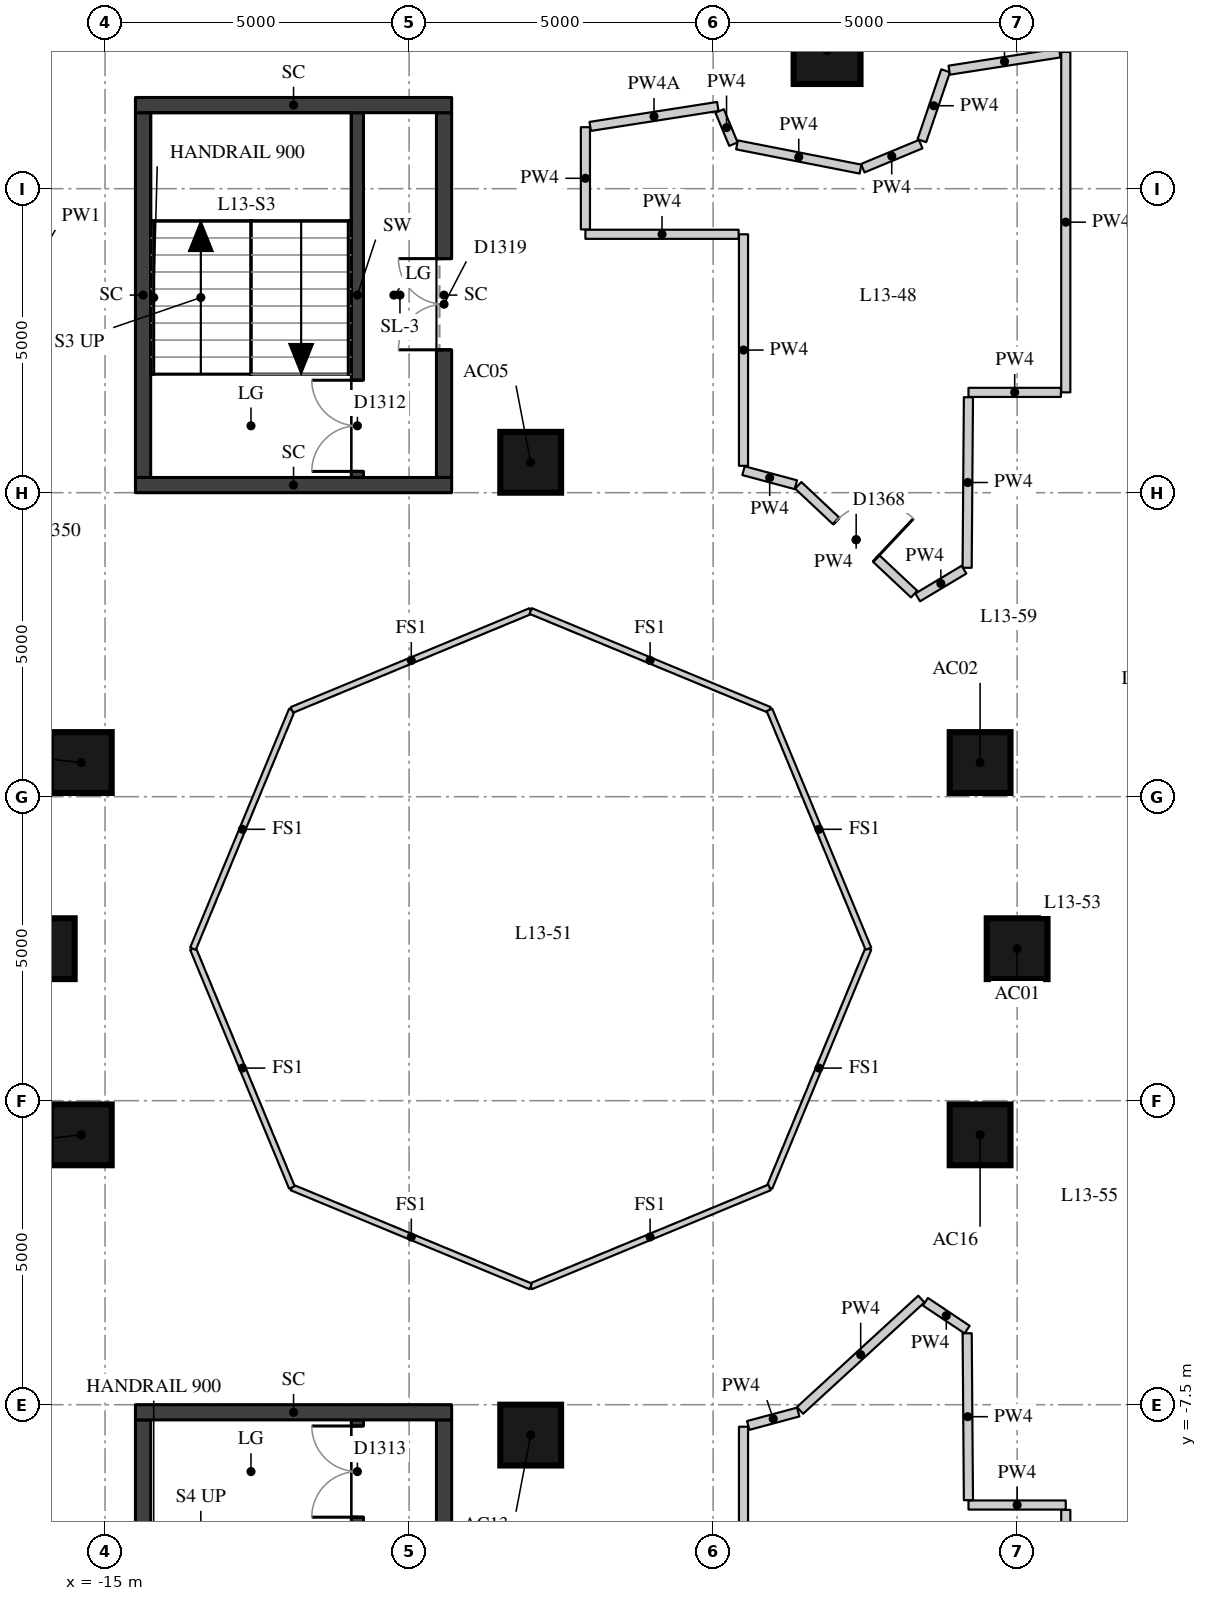
"""IFC4 building model, lengths in metres.
Left out: names, types, materials, properties, quantities, classifications, styles, units other than length and angle.
Written with IfcOpenShell. Run it as: python <this file> out.ifc"""

import sys

from ifc_helpers import new_model, si_unit, direction, frame, frame_2d, origin, origin_2d, place, context, subcontext, project, spatial, rectangle, extrude, element, fill, save


model = new_model("IFC4")
c1 = context("Model", 3, precision=1e-05, world=origin(), true_north=direction((0.0, 1.0)))
c2 = subcontext(c1, "Body", "Model", "MODEL_VIEW")
j1 = project(units=[si_unit("LENGTHUNIT", "METRE"), si_unit("PLANEANGLEUNIT", "RADIAN")], contexts=[c1])
p1 = place(None, origin())
s1 = spatial("IfcSite", under=j1, at=p1, CompositionType="ELEMENT")
p2 = place(p1, origin())
s2 = spatial("IfcBuilding", under=s1, at=p2, CompositionType="ELEMENT")
p3 = place(p2, frame((0.0, 0.0, 51.4)))
s3 = spatial("IfcBuildingStorey", under=s2, at=p3, CompositionType="ELEMENT", Elevation=51.4)
for number, where, z_axis, x_axis in (
    (1, (0.0, 0.0, 0.0), (0.0, 0.0, 1.0), (1.0, 0.0, 0.0)),
    (2, (-0.609, 3.062, 0.0), (0.0, 0.0, 1.0), (1.0, 0.0, 0.0)),
    (3, (-8.0, 8.0, 0.0), (0.0, 0.0, 1.0), (1.0, 0.0, 0.0)),
    (4, (-15.391, 3.062, 0.0), (0.0, 0.0, 1.0), (1.0, 0.0, 0.0)),
    (5, (-16.0, 0.0, 0.0), (0.0, 0.0, 1.0), (1.0, 0.0, 0.0)),
    (6, (-15.391, -3.062, 0.0), (0.0, 0.0, 1.0), (1.0, 0.0, 0.0)),
    (7, (-8.0, -8.0, 0.0), (0.0, 0.0, 1.0), (1.0, 0.0, 0.0)),
    (8, (-0.609, -3.062, 0.0), (0.0, 0.0, 1.0), (1.0, 0.0, 0.0)),
):
    element("IfcColumn", number, at=place(p3, frame(where, z_axis=z_axis, x_axis=x_axis)), inside=s3, PredefinedType="COLUMN", context=c2, shape_type="SweptSolid", body=[
        extrude(rectangle(XDim=1.0, YDim=1.0, at=origin_2d()), origin(), (0.0, 0.0, 1.0), 3.3),
    ])
p4 = place(p3, frame((-3.126, 14.772, 0.0), z_axis=(0.0, 0.0, 1.0), x_axis=(1.0, 0.0, 0.0)))
e9 = element("IfcColumn", 9, at=p4, inside=s3, PredefinedType="COLUMN", context=c2, shape_type="SweptSolid", body=[
    extrude(rectangle(XDim=1.1, YDim=1.1, at=origin_2d()), origin(), (0.0, 0.0, 1.0), 3.3),
])
p5 = place(p3, frame((-10.85, 7.75, 0.0), z_axis=(0.0, 0.0, 1.0), x_axis=(0.0, 1.0, 0.0)))
e10 = element("IfcWall", 10, at=p5, inside=s3, PredefinedType="SHEAR", context=c2, shape_type="SweptSolid", body=[
    extrude(rectangle(XDim=6.0, YDim=0.2, at=frame_2d((3.0, 0.0))), origin(), (0.0, 0.0, 1.0), 3.02),
])
p6 = place(p5, frame((0.1, 0.0, 0.0)))
e11 = element("IfcOpeningElement", 11, at=p6, cuts=e10, PredefinedType="OPENING", context=c2, shape_type="SweptSolid", body=[
    extrude(rectangle(XDim=1.5, YDim=2.1, at=frame_2d((0.75, 1.05))), frame((0.0, 0.11, 0.0), z_axis=(0.0, -1.0, 0.0), x_axis=(1.0, 0.0, 0.0)), (0.0, 0.0, 1.0), 0.22),
])
p7 = place(p3, frame((-10.85, -13.75, 0.0), z_axis=(0.0, 0.0, 1.0), x_axis=(0.0, 1.0, 0.0)))
e12 = element("IfcWall", 12, at=p7, inside=s3, PredefinedType="SHEAR", context=c2, shape_type="SweptSolid", body=[
    extrude(rectangle(XDim=6.0, YDim=0.2, at=frame_2d((3.0, 0.0))), origin(), (0.0, 0.0, 1.0), 3.02),
])
p8 = place(p7, frame((4.4, 0.0, 0.0)))
e13 = element("IfcOpeningElement", 13, at=p8, cuts=e12, PredefinedType="OPENING", context=c2, shape_type="SweptSolid", body=[
    extrude(rectangle(XDim=1.5, YDim=2.1, at=frame_2d((0.75, 1.05))), frame((0.0, 0.11, 0.0), z_axis=(0.0, -1.0, 0.0), x_axis=(1.0, 0.0, 0.0)), (0.0, 0.0, 1.0), 0.22),
])
p9 = place(p3, frame((-14.375, 7.75, -0.28), z_axis=(0.0, 0.0, 1.0), x_axis=(0.0, 1.0, 0.0)))
e14 = element("IfcWall", 14, at=p9, inside=s3, PredefinedType="SHEAR", context=c2, shape_type="SweptSolid", body=[
    extrude(rectangle(XDim=6.0, YDim=0.25, at=frame_2d((3.0, 0.0))), origin(), (0.0, 0.0, 1.0), 3.3),
])
p10 = place(p3, frame((-9.425, 7.75, -0.28), z_axis=(0.0, 0.0, 1.0), x_axis=(0.0, 1.0, 0.0)))
e15 = element("IfcWall", 15, at=p10, inside=s3, PredefinedType="SHEAR", context=c2, shape_type="SweptSolid", body=[
    extrude(rectangle(XDim=6.0, YDim=0.25, at=frame_2d((3.0, 0.0))), origin(), (0.0, 0.0, 1.0), 3.3),
])
p11 = place(p10, frame((2.1, 0.0, 0.28)))
e16 = element("IfcOpeningElement", 16, at=p11, cuts=e15, PredefinedType="OPENING", context=c2, shape_type="SweptSolid", body=[
    extrude(rectangle(XDim=1.5, YDim=2.1, at=frame_2d((0.75, 1.05))), frame((0.0, 0.135, 0.0), z_axis=(0.0, -1.0, 0.0), x_axis=(1.0, 0.0, 0.0)), (0.0, 0.0, 1.0), 0.27),
])
for number, where, z_axis, x_axis in (
    (17, (-14.5, 13.875, -0.28), (0.0, 0.0, 1.0), (1.0, 0.0, 0.0)),
    (18, (-14.5, 7.625, -0.28), (0.0, 0.0, 1.0), (1.0, 0.0, 0.0)),
):
    element("IfcWall", number, at=place(p3, frame(where, z_axis=z_axis, x_axis=x_axis)), inside=s3, PredefinedType="SHEAR", context=c2, shape_type="SweptSolid", body=[
        extrude(rectangle(XDim=5.2, YDim=0.25, at=frame_2d((2.6, 0.0))), origin(), (0.0, 0.0, 1.0), 3.3),
    ])
p12 = place(p3, frame((-14.375, -13.75, -0.28), z_axis=(0.0, 0.0, 1.0), x_axis=(0.0, 1.0, 0.0)))
e19 = element("IfcWall", 19, at=p12, inside=s3, PredefinedType="SHEAR", context=c2, shape_type="SweptSolid", body=[
    extrude(rectangle(XDim=6.0, YDim=0.25, at=frame_2d((3.0, 0.0))), origin(), (0.0, 0.0, 1.0), 3.3),
])
p13 = place(p3, frame((-9.425, -13.75, -0.28), z_axis=(0.0, 0.0, 1.0), x_axis=(0.0, 1.0, 0.0)))
e20 = element("IfcWall", 20, at=p13, inside=s3, PredefinedType="SHEAR", context=c2, shape_type="SweptSolid", body=[
    extrude(rectangle(XDim=6.0, YDim=0.25, at=frame_2d((3.0, 0.0))), origin(), (0.0, 0.0, 1.0), 3.3),
])
p14 = place(p13, frame((2.4, 0.0, 0.28)))
e21 = element("IfcOpeningElement", 21, at=p14, cuts=e20, PredefinedType="OPENING", context=c2, shape_type="SweptSolid", body=[
    extrude(rectangle(XDim=1.5, YDim=2.1, at=frame_2d((0.75, 1.05))), frame((0.0, 0.135, 0.0), z_axis=(0.0, -1.0, 0.0), x_axis=(1.0, 0.0, 0.0)), (0.0, 0.0, 1.0), 0.27),
])
p15 = place(p3, frame((-14.5, -7.625, -0.28), z_axis=(0.0, 0.0, 1.0), x_axis=(1.0, 0.0, 0.0)))
e22 = element("IfcWall", 22, at=p15, inside=s3, PredefinedType="SHEAR", context=c2, shape_type="SweptSolid", body=[
    extrude(rectangle(XDim=5.2, YDim=0.25, at=frame_2d((2.6, 0.0))), origin(), (0.0, 0.0, 1.0), 3.3),
])
p16 = place(p3, frame((0.8, 14.749, 0.0), z_axis=(0.0, 0.0, 1.0), x_axis=(0.0, -1.0, 0.0)))
e23 = element("IfcWall", 23, at=p16, inside=s3, PredefinedType="PARTITIONING", context=c2, shape_type="SweptSolid", body=[
    extrude(rectangle(XDim=5.599, YDim=0.15, at=frame_2d((2.799, 0.0))), origin(), (0.0, 0.0, 1.0), 3.02),
])
p17 = place(p3, frame((0.72, 9.15, 0.0), z_axis=(0.0, 0.0, 1.0), x_axis=(-1.0, 0.0, 0.0)))
e24 = element("IfcWall", 24, at=p17, inside=s3, PredefinedType="PARTITIONING", context=c2, shape_type="SweptSolid", body=[
    extrude(rectangle(XDim=1.52, YDim=0.15, at=frame_2d((0.76, 0.0))), origin(), (0.0, 0.0, 1.0), 3.02),
])
p18 = place(p3, frame((-0.801, 9.07, 0.0), z_axis=(0.0, 0.0, 1.0), x_axis=(-0.007572902619, -0.999971325162, 0.0)))
e25 = element("IfcWall", 25, at=p18, inside=s3, PredefinedType="PARTITIONING", context=c2, shape_type="SweptSolid", body=[
    extrude(rectangle(XDim=2.805, YDim=0.15, at=frame_2d((1.402, 0.0))), origin(), (0.0, 0.0, 1.0), 3.02),
])
p19 = place(p3, frame((-0.874, 6.234, 0.0), z_axis=(0.0, 0.0, 1.0), x_axis=(-0.857759476535, -0.514051242984, 0.0)))
e26 = element("IfcWall", 26, at=p19, inside=s3, PredefinedType="PARTITIONING", context=c2, shape_type="SweptSolid", body=[
    extrude(rectangle(XDim=0.889, YDim=0.15, at=frame_2d((0.444, 0.0))), origin(), (0.0, 0.0, 1.0), 3.02),
])
p20 = place(p3, frame((-1.694, 5.832, 0.0), z_axis=(0.0, 0.0, 1.0), x_axis=(-0.729170056034, 0.684332542981, 0.0)))
e27 = element("IfcWall", 27, at=p20, inside=s3, PredefinedType="PARTITIONING", context=c2, shape_type="SweptSolid", body=[
    extrude(rectangle(XDim=2.614, YDim=0.15, at=frame_2d((1.307, 0.0))), origin(), (0.0, 0.0, 1.0), 3.02),
])
p21 = place(p20, frame((0.857, 0.0, 0.0)))
e28 = element("IfcOpeningElement", 28, at=p21, cuts=e27, PredefinedType="OPENING", context=c2, shape_type="SweptSolid", body=[
    extrude(rectangle(XDim=0.9, YDim=2.1, at=frame_2d((0.45, 1.05))), frame((0.0, 0.085, 0.0), z_axis=(0.0, -1.0, 0.0), x_axis=(1.0, 0.0, 0.0)), (0.0, 0.0, 1.0), 0.17),
])
p22 = place(p3, frame((-3.639, 7.631, 0.0), z_axis=(0.0, 0.0, 1.0), x_axis=(-0.965879594242, 0.258991523853, 0.0)))
e29 = element("IfcWall", 29, at=p22, inside=s3, PredefinedType="PARTITIONING", context=c2, shape_type="SweptSolid", body=[
    extrude(rectangle(XDim=0.892, YDim=0.15, at=frame_2d((0.446, 0.0))), origin(), (0.0, 0.0, 1.0), 3.02),
])
p23 = place(p3, frame((-4.5, 7.942, 0.0), z_axis=(0.0, 0.0, 1.0), x_axis=(0.0, 1.0, 0.0)))
e30 = element("IfcWall", 30, at=p23, inside=s3, PredefinedType="PARTITIONING", context=c2, shape_type="SweptSolid", body=[
    extrude(rectangle(XDim=3.808, YDim=0.15, at=frame_2d((1.904, 0.0))), origin(), (0.0, 0.0, 1.0), 3.02),
])
p24 = place(p3, frame((-4.58, 11.75, 0.0), z_axis=(0.0, 0.0, 1.0), x_axis=(-1.0, 0.0, 0.0)))
e31 = element("IfcWall", 31, at=p24, inside=s3, PredefinedType="PARTITIONING", context=c2, shape_type="SweptSolid", body=[
    extrude(rectangle(XDim=2.52, YDim=0.15, at=frame_2d((1.26, 0.0))), origin(), (0.0, 0.0, 1.0), 3.02),
])
p25 = place(p3, frame((-7.1, 11.83, 0.0), z_axis=(0.0, 0.0, 1.0), x_axis=(0.0, 1.0, 0.0)))
e32 = element("IfcWall", 32, at=p25, inside=s3, PredefinedType="PARTITIONING", context=c2, shape_type="SweptSolid", body=[
    extrude(rectangle(XDim=1.681, YDim=0.15, at=frame_2d((0.841, 0.0))), origin(), (0.0, 0.0, 1.0), 3.02),
])
p26 = place(p3, frame((-7.021, 13.524, 0.0), z_axis=(0.0, 0.0, 1.0), x_axis=(0.987976394461, 0.154604799366, 0.0)))
e33 = element("IfcWall", 33, at=p26, inside=s3, PredefinedType="PARTITIONING", context=c2, shape_type="SweptSolid", body=[
    extrude(rectangle(XDim=2.124, YDim=0.15, at=frame_2d((1.062, 0.0))), origin(), (0.0, 0.0, 1.0), 2.57),
])
p27 = place(p3, frame((-4.892, 13.778, 0.0), z_axis=(0.0, 0.0, 1.0), x_axis=(0.383178293395, -0.923674399056, 0.0)))
e34 = element("IfcWall", 34, at=p27, inside=s3, PredefinedType="PARTITIONING", context=c2, shape_type="SweptSolid", body=[
    extrude(rectangle(XDim=0.591, YDim=0.15, at=frame_2d((0.296, 0.0))), origin(), (0.0, 0.0, 1.0), 3.02),
])
p28 = place(p3, frame((-4.607, 13.22, 0.0), z_axis=(0.0, 0.0, 1.0), x_axis=(0.981304142817, -0.192463449234, 0.0)))
e35 = element("IfcWall", 35, at=p28, inside=s3, PredefinedType="PARTITIONING", context=c2, shape_type="SweptSolid", body=[
    extrude(rectangle(XDim=2.07, YDim=0.15, at=frame_2d((1.035, 0.0))), origin(), (0.0, 0.0, 1.0), 3.02),
])
p29 = place(p3, frame((-2.539, 12.837, 0.0), z_axis=(0.0, 0.0, 1.0), x_axis=(0.923768662954, 0.382950985565, 0.0)))
e36 = element("IfcWall", 36, at=p29, inside=s3, PredefinedType="PARTITIONING", context=c2, shape_type="SweptSolid", body=[
    extrude(rectangle(XDim=1.031, YDim=0.15, at=frame_2d((0.516, 0.0))), origin(), (0.0, 0.0, 1.0), 3.02),
])
p30 = place(p3, frame((-1.567, 13.289, 0.0), z_axis=(0.0, 0.0, 1.0), x_axis=(0.321769415776, 0.946818062286, 0.0)))
e37 = element("IfcWall", 37, at=p30, inside=s3, PredefinedType="PARTITIONING", context=c2, shape_type="SweptSolid", body=[
    extrude(rectangle(XDim=1.215, YDim=0.15, at=frame_2d((0.607, 0.0))), origin(), (0.0, 0.0, 1.0), 3.02),
])
p31 = place(p3, frame((-1.116, 14.449, 0.0), z_axis=(0.0, 0.0, 1.0), x_axis=(0.988017726025, 0.154340445315, 0.0)))
e38 = element("IfcWall", 38, at=p31, inside=s3, PredefinedType="PARTITIONING", context=c2, shape_type="SweptSolid", body=[
    extrude(rectangle(XDim=1.84, YDim=0.15, at=frame_2d((0.92, 0.0))), origin(), (0.0, 0.0, 1.0), 2.42),
])
p32 = place(p3, frame((-0.8, -9.15, 0.0), z_axis=(0.0, 0.0, 1.0), x_axis=(1.0, 0.0, 0.0)))
e39 = element("IfcWall", 39, at=p32, inside=s3, PredefinedType="PARTITIONING", context=c2, shape_type="SweptSolid", body=[
    extrude(rectangle(XDim=1.6, YDim=0.15, at=frame_2d((0.8, 0.0))), origin(), (0.0, 0.0, 1.0), 3.02),
])
p33 = place(p3, frame((0.8, -9.23, 0.0), z_axis=(0.0, 0.0, 1.0), x_axis=(0.0, -1.0, 0.0)))
e40 = element("IfcWall", 40, at=p33, inside=s3, PredefinedType="PARTITIONING", context=c2, shape_type="SweptSolid", body=[
    extrude(rectangle(XDim=5.93, YDim=0.15, at=frame_2d((2.965, 0.0))), origin(), (0.0, 0.0, 1.0), 3.02),
])
p34 = place(p33, frame((2.515, 0.0, 0.0)))
e41 = element("IfcOpeningElement", 41, at=p34, cuts=e40, PredefinedType="OPENING", context=c2, shape_type="SweptSolid", body=[
    extrude(rectangle(XDim=0.9, YDim=2.1, at=frame_2d((0.45, 1.05))), frame((0.0, 0.085, 0.0), z_axis=(0.0, -1.0, 0.0), x_axis=(1.0, 0.0, 0.0)), (0.0, 0.0, 1.0), 0.17),
])
p35 = place(p3, frame((-4.5, -11.67, 0.0), z_axis=(0.0, 0.0, 1.0), x_axis=(0.0, 1.0, 0.0)))
e42 = element("IfcWall", 42, at=p35, inside=s3, PredefinedType="PARTITIONING", context=c2, shape_type="SweptSolid", body=[
    extrude(rectangle(XDim=3.808, YDim=0.15, at=frame_2d((1.904, 0.0))), origin(), (0.0, 0.0, 1.0), 3.02),
])
p36 = place(p3, frame((-4.423, -7.842, 0.0), z_axis=(0.0, 0.0, 1.0), x_axis=(0.965853333569, 0.259089440221, 0.0)))
e43 = element("IfcWall", 43, at=p36, inside=s3, PredefinedType="PARTITIONING", context=c2, shape_type="SweptSolid", body=[
    extrude(rectangle(XDim=0.852, YDim=0.15, at=frame_2d((0.426, 0.0))), origin(), (0.0, 0.0, 1.0), 3.02),
])
p37 = place(p3, frame((-3.571, -7.594, 0.0), z_axis=(0.0, 0.0, 1.0), x_axis=(0.736783660812, 0.676128565555, 0.0)))
e44 = element("IfcWall", 44, at=p37, inside=s3, PredefinedType="PARTITIONING", context=c2, shape_type="SweptSolid", body=[
    extrude(rectangle(XDim=2.709, YDim=0.15, at=frame_2d((1.354, 0.0))), origin(), (0.0, 0.0, 1.0), 3.02),
])
p38 = place(p3, frame((-1.509, -5.806, 0.0), z_axis=(0.0, 0.0, 1.0), x_axis=(0.831367153095, -0.55572354346, 0.0)))
e45 = element("IfcWall", 45, at=p38, inside=s3, PredefinedType="PARTITIONING", context=c2, shape_type="SweptSolid", body=[
    extrude(rectangle(XDim=0.825, YDim=0.15, at=frame_2d((0.413, 0.0))), origin(), (0.0, 0.0, 1.0), 3.02),
])
p39 = place(p3, frame((-0.822, -6.325, 0.0), z_axis=(0.0, 0.0, 1.0), x_axis=(0.007471771501, -0.999972085926, 0.0)))
e46 = element("IfcWall", 46, at=p39, inside=s3, PredefinedType="PARTITIONING", context=c2, shape_type="SweptSolid", body=[
    extrude(rectangle(XDim=2.745, YDim=0.15, at=frame_2d((1.372, 0.0))), origin(), (0.0, 0.0, 1.0), 3.02),
])
for number, where, z_axis, x_axis in (
    (47, (-2.446, 0.0, 0.0), (0.0, 0.0, 1.0), (-0.383, -0.924, 0.0)),
    (48, (-4.073, -3.927, 0.0), (0.0, 0.0, 1.0), (-0.924, -0.383, 0.0)),
    (49, (-8.0, -5.554, 0.0), (0.0, 0.0, 1.0), (-0.924, 0.383, 0.0)),
    (50, (-11.927, -3.927, 0.0), (0.0, 0.0, 1.0), (-0.383, 0.924, 0.0)),
    (51, (-13.554, 0.0, 0.0), (0.0, 0.0, 1.0), (0.383, 0.924, 0.0)),
    (52, (-11.927, 3.927, 0.0), (0.0, 0.0, 1.0), (0.924, 0.383, 0.0)),
    (53, (-8.0, 5.554, 0.0), (0.0, 0.0, 1.0), (0.924, -0.383, 0.0)),
    (54, (-4.073, 3.927, 0.0), (0.0, 0.0, 1.0), (0.383, -0.924, 0.0)),
):
    element("IfcWall", number, at=place(p3, frame(where, z_axis=z_axis, x_axis=x_axis)), inside=s3, PredefinedType="PARTITIONING", context=c2, shape_type="SweptSolid", body=[
        extrude(rectangle(XDim=4.251, YDim=0.1, at=frame_2d((2.125, 0.0))), origin(), (0.0, 0.0, 1.0), 3.02),
    ])
p40 = place(p6, origin())
e55 = element("IfcDoor", 55, at=p40, inside=s3, OperationType="DOUBLE_DOOR_SINGLE_SWING", PredefinedType="DOOR", context=c2, shape_type="SweptSolid", body=[
    extrude(rectangle(XDim=1.5, YDim=2.1, at=frame_2d((0.75, 1.05))), frame((0.0, 0.025, 0.0), z_axis=(0.0, -1.0, 0.0), x_axis=(1.0, 0.0, 0.0)), (0.0, 0.0, 1.0), 0.05),
])
fill(e11, e55)
p41 = place(p8, origin())
e56 = element("IfcDoor", 56, at=p41, inside=s3, OperationType="DOUBLE_DOOR_SINGLE_SWING", PredefinedType="DOOR", context=c2, shape_type="SweptSolid", body=[
    extrude(rectangle(XDim=1.5, YDim=2.1, at=frame_2d((0.75, 1.05))), frame((0.0, 0.025, 0.0), z_axis=(0.0, -1.0, 0.0), x_axis=(1.0, 0.0, 0.0)), (0.0, 0.0, 1.0), 0.05),
])
fill(e13, e56)
p42 = place(p11, origin())
e57 = element("IfcDoor", 57, at=p42, inside=s3, OperationType="DOUBLE_DOOR_SINGLE_SWING", PredefinedType="DOOR", context=c2, shape_type="SweptSolid", body=[
    extrude(rectangle(XDim=1.5, YDim=2.1, at=frame_2d((0.75, 1.05))), frame((0.0, 0.025, 0.0), z_axis=(0.0, -1.0, 0.0), x_axis=(1.0, 0.0, 0.0)), (0.0, 0.0, 1.0), 0.05),
])
fill(e16, e57)
p43 = place(p21, origin())
e58 = element("IfcDoor", 58, at=p43, inside=s3, OperationType="SINGLE_SWING_RIGHT", PredefinedType="DOOR", context=c2, shape_type="SweptSolid", body=[
    extrude(rectangle(XDim=0.9, YDim=2.1, at=frame_2d((0.45, 1.05))), frame((0.0, 0.025, 0.0), z_axis=(0.0, -1.0, 0.0), x_axis=(1.0, 0.0, 0.0)), (0.0, 0.0, 1.0), 0.05),
])
fill(e28, e58)
save(model, sys.argv[1])
